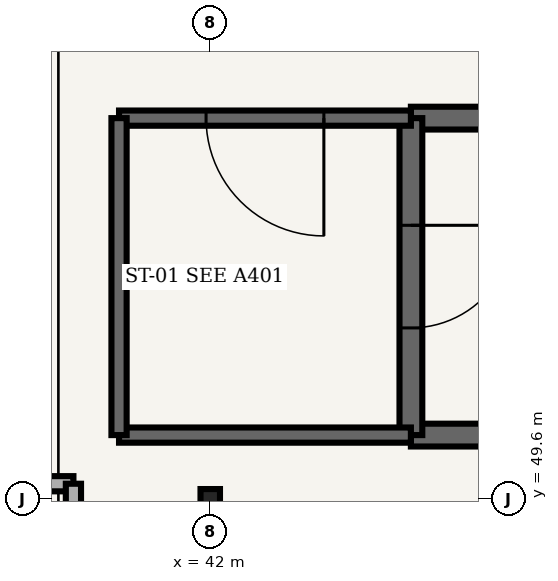
"""IFC4 building model, lengths in metres.
Left out: names, types, materials, properties, quantities, classifications, styles, units other than length and angle.
Written with IfcOpenShell. Run it as: python <this file> out.ifc"""

import sys

from ifc_helpers import new_model, si_unit, direction, frame, frame_2d, origin, origin_2d, place, context, subcontext, project, spatial, rectangle, i_section, extrude, element, fill, save


model = new_model("IFC4")
c1 = context("Model", 3, precision=1e-05, world=origin(), true_north=direction((0.0, 1.0)))
c2 = subcontext(c1, "Body", "Model", "MODEL_VIEW")
j1 = project(units=[si_unit("LENGTHUNIT", "METRE"), si_unit("PLANEANGLEUNIT", "RADIAN")], contexts=[c1])
p1 = place(None, origin())
s1 = spatial("IfcSite", under=j1, at=p1, CompositionType="ELEMENT")
p2 = place(p1, origin())
s2 = spatial("IfcBuilding", under=s1, at=p2, CompositionType="ELEMENT")
p3 = place(p2, frame((0.0, 0.0, 5.4)))
s3 = spatial("IfcBuildingStorey", under=s2, at=p3, CompositionType="ELEMENT", Elevation=5.4)
p4 = place(p3, frame((42.0, 49.6, 0.0), z_axis=(0.0, 0.0, 1.0), x_axis=(1.0, 0.0, 0.0)))
e1 = element("IfcColumn", 1, at=p4, inside=s3, PredefinedType="COLUMN", context=c2, shape_type="SweptSolid", body=[
    extrude(i_section(OverallWidth=0.256, OverallDepth=0.26, WebThickness=0.01, FlangeThickness=0.017, FilletRadius=0.013, at=origin_2d()), origin(), (0.0, 0.0, 1.0), 5.4),
])
for number, where, z_axis, x_axis in (
    (2, (44.64, 50.44, 0.0), (0.0, 0.0, 1.0), (1.0, 0.0, 0.0)),
    (3, (53.16, 54.61, 0.0), (0.0, 0.0, 1.0), (-1.0, 0.0, 0.0)),
):
    element("IfcWall", number, at=place(p3, frame(where, z_axis=z_axis, x_axis=x_axis)), inside=s3, PredefinedType="SHEAR", context=c2, shape_type="SweptSolid", body=[
        extrude(rectangle(XDim=8.52, YDim=0.3, at=frame_2d((4.26, 0.0))), origin(), (0.0, 0.0, 1.0), 5.15),
    ])
p5 = place(p3, frame((44.64, 54.61, 0.0), z_axis=(0.0, 0.0, 1.0), x_axis=(0.0, -1.0, 0.0)))
e4 = element("IfcWall", 4, at=p5, inside=s3, PredefinedType="SHEAR", context=c2, shape_type="SweptSolid", body=[
    extrude(rectangle(XDim=4.17, YDim=0.3, at=frame_2d((2.085, 0.0))), origin(), (0.0, 0.0, 1.0), 5.15),
])
p6 = place(p5, frame((1.41, 0.0, 0.0)))
e5 = element("IfcOpeningElement", 5, at=p6, cuts=e4, PredefinedType="OPENING", context=c2, shape_type="SweptSolid", body=[
    extrude(rectangle(XDim=1.35, YDim=2.2, at=frame_2d((0.675, 1.1))), frame((0.0, 0.16, 0.0), z_axis=(0.0, -1.0, 0.0), x_axis=(1.0, 0.0, 0.0)), (0.0, 0.0, 1.0), 0.32),
])
p7 = place(p3, frame((40.8, 50.44, 0.0), z_axis=(0.0, 0.0, 1.0), x_axis=(1.0, 0.0, 0.0)))
e6 = element("IfcWall", 6, at=p7, inside=s3, PredefinedType="SHEAR", context=c2, shape_type="SweptSolid", body=[
    extrude(rectangle(XDim=3.84, YDim=0.2, at=frame_2d((1.92, 0.0))), origin(), (0.0, 0.0, 1.0), 5.15),
])
p8 = place(p3, frame((44.64, 54.61, 0.0), z_axis=(0.0, 0.0, 1.0), x_axis=(-1.0, 0.0, 0.0)))
e7 = element("IfcWall", 7, at=p8, inside=s3, PredefinedType="SHEAR", context=c2, shape_type="SweptSolid", body=[
    extrude(rectangle(XDim=3.84, YDim=0.2, at=frame_2d((1.92, 0.0))), origin(), (0.0, 0.0, 1.0), 5.15),
])
p9 = place(p8, frame((1.145, 0.0, 0.0)))
e8 = element("IfcOpeningElement", 8, at=p9, cuts=e7, PredefinedType="OPENING", context=c2, shape_type="SweptSolid", body=[
    extrude(rectangle(XDim=1.55, YDim=2.2, at=frame_2d((0.775, 1.1))), frame((0.0, 0.11, 0.0), z_axis=(0.0, -1.0, 0.0), x_axis=(1.0, 0.0, 0.0)), (0.0, 0.0, 1.0), 0.22),
])
p10 = place(p3, frame((40.8, 54.61, 0.0), z_axis=(0.0, 0.0, 1.0), x_axis=(0.0, -1.0, 0.0)))
e9 = element("IfcWall", 9, at=p10, inside=s3, PredefinedType="SHEAR", context=c2, shape_type="SweptSolid", body=[
    extrude(rectangle(XDim=4.17, YDim=0.2, at=frame_2d((2.085, 0.0))), origin(), (0.0, 0.0, 1.0), 5.15),
])
p11 = place(p3, frame((25.6, 49.8, 0.0), z_axis=(0.0, 0.0, 1.0), x_axis=(1.0, 0.0, 0.0)))
e10 = element("IfcWall", 10, at=p11, inside=s3, PredefinedType="PARTITIONING", context=c2, shape_type="SweptSolid", body=[
    extrude(rectangle(XDim=14.6, YDim=0.2, at=frame_2d((7.3, 0.0))), origin(), (0.0, 0.0, 1.0), 4.35),
])
p12 = place(p11, frame((6.7, 0.0, 0.0)))
e11 = element("IfcOpeningElement", 11, at=p12, cuts=e10, PredefinedType="OPENING", context=c2, shape_type="SweptSolid", body=[
    extrude(rectangle(XDim=1.2, YDim=2.25, at=frame_2d((0.6, 1.125))), frame((0.0, 0.11, 0.0), z_axis=(0.0, -1.0, 0.0), x_axis=(1.0, 0.0, 0.0)), (0.0, 0.0, 1.0), 0.22),
])
p13 = place(p3, frame((40.2, 49.8, 0.0), z_axis=(0.0, 0.0, 1.0), x_axis=(0.0, -1.0, 0.0)))
e12 = element("IfcWall", 12, at=p13, inside=s3, PredefinedType="PARTITIONING", context=c2, shape_type="SweptSolid", body=[
    extrude(rectangle(XDim=12.0, YDim=0.2, at=frame_2d((6.0, 0.0))), origin(), (0.0, 0.0, 1.0), 4.35),
])
p14 = place(p6, origin())
e13 = element("IfcDoor", 13, at=p14, inside=s3, OperationType="SINGLE_SWING_LEFT", PredefinedType="DOOR", context=c2, shape_type="SweptSolid", body=[
    extrude(rectangle(XDim=1.35, YDim=2.2, at=frame_2d((0.675, 1.1))), frame((0.0, 0.025, 0.0), z_axis=(0.0, -1.0, 0.0), x_axis=(1.0, 0.0, 0.0)), (0.0, 0.0, 1.0), 0.05),
])
fill(e5, e13)
p15 = place(p9, origin())
e14 = element("IfcDoor", 14, at=p15, inside=s3, OperationType="SINGLE_SWING_LEFT", PredefinedType="DOOR", context=c2, shape_type="SweptSolid", body=[
    extrude(rectangle(XDim=1.55, YDim=2.2, at=frame_2d((0.775, 1.1))), frame((0.0, 0.025, 0.0), z_axis=(0.0, -1.0, 0.0), x_axis=(1.0, 0.0, 0.0)), (0.0, 0.0, 1.0), 0.05),
])
fill(e8, e14)
save(model, sys.argv[1])
